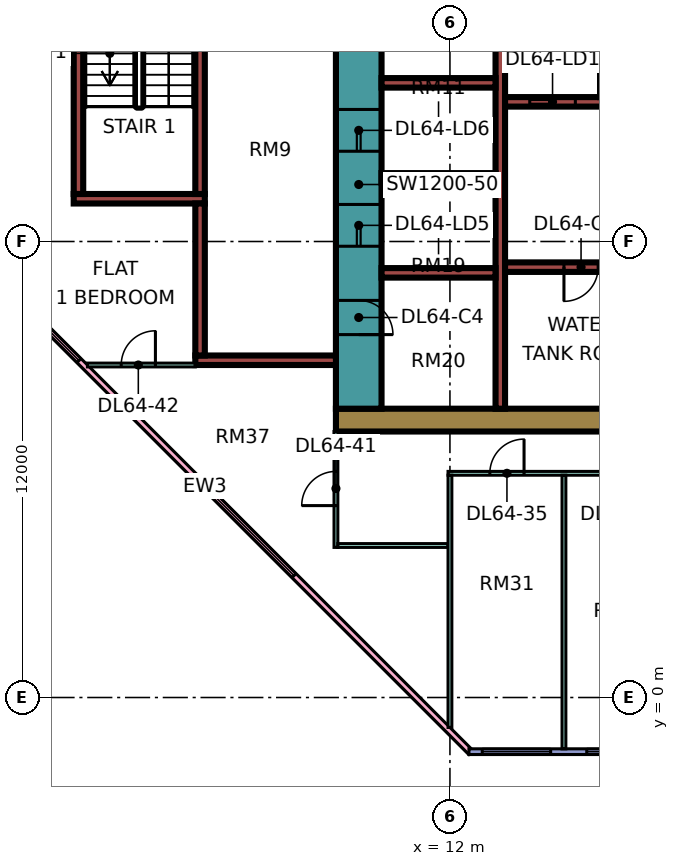
"""IFC4 building model, lengths in metres.
Left out: names, types, materials, properties, quantities, classifications, styles, units other than length and angle.
Written with IfcOpenShell. Run it as: python <this file> out.ifc"""

import sys

from ifc_helpers import new_model, si_unit, direction, frame, frame_2d, origin, place, context, subcontext, project, spatial, rectangle, extrude, element, fill, save


model = new_model("IFC4")
c1 = context("Model", 3, precision=1e-05, world=origin(), true_north=direction((0.0, 1.0)))
c2 = subcontext(c1, "Body", "Model", "MODEL_VIEW")
j1 = project(units=[si_unit("LENGTHUNIT", "METRE"), si_unit("PLANEANGLEUNIT", "RADIAN")], contexts=[c1])
p1 = place(None, origin())
s1 = spatial("IfcSite", under=j1, at=p1, CompositionType="ELEMENT")
p2 = place(p1, origin())
s2 = spatial("IfcBuilding", under=s1, at=p2, CompositionType="ELEMENT")
p3 = place(p2, frame((0.0, 0.0, 277.15)))
s3 = spatial("IfcBuildingStorey", under=s2, at=p3, CompositionType="ELEMENT", Elevation=277.15)
p4 = place(p3, frame((9.0, 7.3, 0.0), z_axis=(0.0, 0.0, 1.0), x_axis=(1.0, 0.0, 0.0)))
e1 = element("IfcWall", 1, at=p4, inside=s3, PredefinedType="SHEAR", context=c2, shape_type="SweptSolid", body=[
    extrude(rectangle(XDim=25.0, YDim=0.6, at=frame_2d((12.5, 0.0))), origin(), (0.0, 0.0, 1.0), 3.75),
])
p5 = place(p3, frame((9.6, 7.6, 0.0), z_axis=(0.0, 0.0, 1.0), x_axis=(0.0, 1.0, 0.0)))
e2 = element("IfcWall", 2, at=p5, inside=s3, PredefinedType="SHEAR", context=c2, shape_type="SweptSolid", body=[
    extrude(rectangle(XDim=11.8, YDim=1.2, at=frame_2d((5.9, 0.0))), origin(), (0.0, 0.0, 1.0), 3.75),
])
p6 = place(p5, frame((4.275, 0.0, 0.0)))
e3 = element("IfcOpeningElement", 3, at=p6, cuts=e2, PredefinedType="OPENING", context=c2, shape_type="SweptSolid", body=[
    extrude(rectangle(XDim=1.1, YDim=2.2, at=frame_2d((0.55, 1.1))), frame((0.0, 0.61, 0.0), z_axis=(0.0, -1.0, 0.0), x_axis=(1.0, 0.0, 0.0)), (0.0, 0.0, 1.0), 1.22),
])
p7 = place(p5, frame((6.775, 0.0, 0.0)))
e4 = element("IfcOpeningElement", 4, at=p7, cuts=e2, PredefinedType="OPENING", context=c2, shape_type="SweptSolid", body=[
    extrude(rectangle(XDim=1.1, YDim=2.2, at=frame_2d((0.55, 1.1))), frame((0.0, 0.61, 0.0), z_axis=(0.0, -1.0, 0.0), x_axis=(1.0, 0.0, 0.0)), (0.0, 0.0, 1.0), 1.22),
])
p8 = place(p5, frame((9.7, 0.0, 0.0)))
e5 = element("IfcOpeningElement", 5, at=p8, cuts=e2, PredefinedType="OPENING", context=c2, shape_type="SweptSolid", body=[
    extrude(rectangle(XDim=1.1, YDim=2.2, at=frame_2d((0.55, 1.1))), frame((0.0, 0.61, 0.0), z_axis=(0.0, -1.0, 0.0), x_axis=(1.0, 0.0, 0.0)), (0.0, 0.0, 1.0), 1.22),
])
p9 = place(p5, frame((1.95, 0.0, 0.0)))
e6 = element("IfcOpeningElement", 6, at=p9, cuts=e2, PredefinedType="OPENING", context=c2, shape_type="SweptSolid", body=[
    extrude(rectangle(XDim=0.9, YDim=2.1, at=frame_2d((0.45, 1.05))), frame((0.0, 0.61, 0.0), z_axis=(0.0, -1.0, 0.0), x_axis=(1.0, 0.0, 0.0)), (0.0, 0.0, 1.0), 1.22),
])
p10 = place(p3, frame((13.325, 7.6, 0.0), z_axis=(0.0, 0.0, 1.0), x_axis=(0.0, 1.0, 0.0)))
e7 = element("IfcWall", 7, at=p10, inside=s3, PredefinedType="SHEAR", context=c2, shape_type="SweptSolid", body=[
    extrude(rectangle(XDim=11.8, YDim=0.25, at=frame_2d((5.9, 0.0))), origin(), (0.0, 0.0, 1.0), 3.75),
])
p11 = place(p3, frame((13.45, 11.325, 0.0), z_axis=(0.0, 0.0, 1.0), x_axis=(1.0, 0.0, 0.0)))
e8 = element("IfcWall", 8, at=p11, inside=s3, PredefinedType="SHEAR", context=c2, shape_type="SweptSolid", body=[
    extrude(rectangle(XDim=19.95, YDim=0.25, at=frame_2d((9.975, 0.0))), origin(), (0.0, 0.0, 1.0), 3.75),
])
p12 = place(p11, frame((1.55, 0.0, 0.0)))
e9 = element("IfcOpeningElement", 9, at=p12, cuts=e8, PredefinedType="OPENING", context=c2, shape_type="SweptSolid", body=[
    extrude(rectangle(XDim=0.9, YDim=2.1, at=frame_2d((0.45, 1.05))), frame((0.0, 0.135, 0.0), z_axis=(0.0, -1.0, 0.0), x_axis=(1.0, 0.0, 0.0)), (0.0, 0.0, 1.0), 0.27),
])
p13 = place(p11, frame((5.05, 0.0, 0.0)))
e10 = element("IfcOpeningElement", 10, at=p13, cuts=e8, PredefinedType="OPENING", context=c2, shape_type="SweptSolid", body=[
    extrude(rectangle(XDim=0.9, YDim=2.1, at=frame_2d((0.45, 1.05))), frame((0.0, 0.135, 0.0), z_axis=(0.0, -1.0, 0.0), x_axis=(1.0, 0.0, 0.0)), (0.0, 0.0, 1.0), 0.27),
])
p14 = place(p11, frame((8.425, 0.0, 0.0)))
e11 = element("IfcOpeningElement", 11, at=p14, cuts=e8, PredefinedType="OPENING", context=c2, shape_type="SweptSolid", body=[
    extrude(rectangle(XDim=0.9, YDim=2.1, at=frame_2d((0.45, 1.05))), frame((0.0, 0.135, 0.0), z_axis=(0.0, -1.0, 0.0), x_axis=(1.0, 0.0, 0.0)), (0.0, 0.0, 1.0), 0.27),
])
p15 = place(p11, frame((15.025, 0.0, 0.0)))
e12 = element("IfcOpeningElement", 12, at=p15, cuts=e8, PredefinedType="OPENING", context=c2, shape_type="SweptSolid", body=[
    extrude(rectangle(XDim=0.9, YDim=2.1, at=frame_2d((0.45, 1.05))), frame((0.0, 0.135, 0.0), z_axis=(0.0, -1.0, 0.0), x_axis=(1.0, 0.0, 0.0)), (0.0, 0.0, 1.0), 0.27),
])
p16 = place(p3, frame((13.45, 15.675, 0.0), z_axis=(0.0, 0.0, 1.0), x_axis=(1.0, 0.0, 0.0)))
e13 = element("IfcWall", 13, at=p16, inside=s3, PredefinedType="SHEAR", context=c2, shape_type="SweptSolid", body=[
    extrude(rectangle(XDim=13.75, YDim=0.25, at=frame_2d((6.875, 0.0))), origin(), (0.0, 0.0, 1.0), 3.75),
])
p17 = place(p16, frame((0.65, 0.0, 0.0)))
e14 = element("IfcOpeningElement", 14, at=p17, cuts=e13, PredefinedType="OPENING", context=c2, shape_type="SweptSolid", body=[
    extrude(rectangle(XDim=1.2, YDim=2.2, at=frame_2d((0.6, 1.1))), frame((0.0, 0.135, 0.0), z_axis=(0.0, -1.0, 0.0), x_axis=(1.0, 0.0, 0.0)), (0.0, 0.0, 1.0), 0.27),
])
p18 = place(p16, frame((3.4, 0.0, 0.0)))
e15 = element("IfcOpeningElement", 15, at=p18, cuts=e13, PredefinedType="OPENING", context=c2, shape_type="SweptSolid", body=[
    extrude(rectangle(XDim=1.2, YDim=2.2, at=frame_2d((0.6, 1.1))), frame((0.0, 0.135, 0.0), z_axis=(0.0, -1.0, 0.0), x_axis=(1.0, 0.0, 0.0)), (0.0, 0.0, 1.0), 0.27),
])
p19 = place(p16, frame((6.15, 0.0, 0.0)))
e16 = element("IfcOpeningElement", 16, at=p19, cuts=e13, PredefinedType="OPENING", context=c2, shape_type="SweptSolid", body=[
    extrude(rectangle(XDim=1.2, YDim=2.2, at=frame_2d((0.6, 1.1))), frame((0.0, 0.135, 0.0), z_axis=(0.0, -1.0, 0.0), x_axis=(1.0, 0.0, 0.0)), (0.0, 0.0, 1.0), 0.27),
])
p20 = place(p16, frame((8.9, 0.0, 0.0)))
e17 = element("IfcOpeningElement", 17, at=p20, cuts=e13, PredefinedType="OPENING", context=c2, shape_type="SweptSolid", body=[
    extrude(rectangle(XDim=1.2, YDim=2.2, at=frame_2d((0.6, 1.1))), frame((0.0, 0.135, 0.0), z_axis=(0.0, -1.0, 0.0), x_axis=(1.0, 0.0, 0.0)), (0.0, 0.0, 1.0), 0.27),
])
p21 = place(p16, frame((11.8, 0.0, 0.0)))
e18 = element("IfcOpeningElement", 18, at=p21, cuts=e13, PredefinedType="OPENING", context=c2, shape_type="SweptSolid", body=[
    extrude(rectangle(XDim=0.9, YDim=2.1, at=frame_2d((0.45, 1.05))), frame((0.0, 0.135, 0.0), z_axis=(0.0, -1.0, 0.0), x_axis=(1.0, 0.0, 0.0)), (0.0, 0.0, 1.0), 0.27),
])
for number, where, z_axis, x_axis in (
    (19, (10.2, 11.175, 0.0), (0.0, 0.0, 1.0), (1.0, 0.0, 0.0)),
    (20, (10.2, 13.675, 0.0), (0.0, 0.0, 1.0), (1.0, 0.0, 0.0)),
    (21, (10.2, 16.175, 0.0), (0.0, 0.0, 1.0), (1.0, 0.0, 0.0)),
):
    element("IfcWall", number, at=place(p3, frame(where, z_axis=z_axis, x_axis=x_axis)), inside=s3, PredefinedType="SHEAR", context=c2, shape_type="SweptSolid", body=[
        extrude(rectangle(XDim=3.0, YDim=0.25, at=frame_2d((1.5, 0.0))), origin(), (0.0, 0.0, 1.0), 3.75),
    ])
p22 = place(p3, frame((2.1, 13.125, 0.0), z_axis=(0.0, 0.0, 1.0), x_axis=(1.0, 0.0, 0.0)))
e22 = element("IfcWall", 22, at=p22, inside=s3, PredefinedType="SHEAR", context=c2, shape_type="SweptSolid", body=[
    extrude(rectangle(XDim=3.45, YDim=0.25, at=frame_2d((1.725, 0.0))), origin(), (0.0, 0.0, 1.0), 3.75),
])
p23 = place(p3, frame((2.225, 13.25, 0.0), z_axis=(0.0, 0.0, 1.0), x_axis=(0.0, 1.0, 0.0)))
e23 = element("IfcWall", 23, at=p23, inside=s3, PredefinedType="SHEAR", context=c2, shape_type="SweptSolid", body=[
    extrude(rectangle(XDim=6.5, YDim=0.25, at=frame_2d((3.25, 0.0))), origin(), (0.0, 0.0, 1.0), 3.75),
])
p24 = place(p3, frame((5.425, 13.25, 0.0), z_axis=(0.0, 0.0, 1.0), x_axis=(0.0, 1.0, 0.0)))
e24 = element("IfcWall", 24, at=p24, inside=s3, PredefinedType="SHEAR", context=c2, shape_type="SweptSolid", body=[
    extrude(rectangle(XDim=6.5, YDim=0.25, at=frame_2d((3.25, 0.0))), origin(), (0.0, 0.0, 1.0), 3.75),
])
p25 = place(p24, frame((5.25, 0.0, 0.0)))
e25 = element("IfcOpeningElement", 25, at=p25, cuts=e24, PredefinedType="OPENING", context=c2, shape_type="SweptSolid", body=[
    extrude(rectangle(XDim=1.1, YDim=2.2, at=frame_2d((0.55, 1.1))), frame((0.0, 0.135, 0.0), z_axis=(0.0, -1.0, 0.0), x_axis=(1.0, 0.0, 0.0)), (0.0, 0.0, 1.0), 0.27),
])
p26 = place(p3, frame((5.3, 8.875, 0.0), z_axis=(0.0, 0.0, 1.0), x_axis=(1.0, 0.0, 0.0)))
e26 = element("IfcWall", 26, at=p26, inside=s3, PredefinedType="SHEAR", context=c2, shape_type="SweptSolid", body=[
    extrude(rectangle(XDim=3.7, YDim=0.25, at=frame_2d((1.85, 0.0))), origin(), (0.0, 0.0, 1.0), 3.75),
])
p27 = place(p3, frame((5.425, 9.0, 0.0), z_axis=(0.0, 0.0, 1.0), x_axis=(0.0, 1.0, 0.0)))
e27 = element("IfcWall", 27, at=p27, inside=s3, PredefinedType="SHEAR", context=c2, shape_type="SweptSolid", body=[
    extrude(rectangle(XDim=4.0, YDim=0.25, at=frame_2d((2.0, 0.0))), origin(), (0.0, 0.0, 1.0), 3.75),
])
p28 = place(p3, frame((-1.447, 12.553, 0.0), z_axis=(0.0, 0.0, 1.0), x_axis=(0.707106781187, -0.707106781187, 0.0)))
e28 = element("IfcWall", 28, at=p28, inside=s3, PredefinedType="SOLIDWALL", context=c2, shape_type="SweptSolid", body=[
    extrude(rectangle(XDim=19.799, YDim=0.15, at=frame_2d((9.899, 0.0))), origin(), (0.0, 0.0, 1.0), 3.35),
])
p29 = place(p28, frame((2.212, 0.0, 0.45)))
e29 = element("IfcOpeningElement", 29, at=p29, cuts=e28, PredefinedType="OPENING", context=c2, shape_type="SweptSolid", body=[
    extrude(rectangle(XDim=3.0, YDim=2.4, at=frame_2d((1.5, 1.2))), frame((0.0, 0.085, 0.0), z_axis=(0.0, -1.0, 0.0), x_axis=(1.0, 0.0, 0.0)), (0.0, 0.0, 1.0), 0.17),
])
p30 = place(p28, frame((10.216, 0.0, 0.45)))
e30 = element("IfcOpeningElement", 30, at=p30, cuts=e28, PredefinedType="OPENING", context=c2, shape_type="SweptSolid", body=[
    extrude(rectangle(XDim=3.0, YDim=2.4, at=frame_2d((1.5, 1.2))), frame((0.0, 0.085, 0.0), z_axis=(0.0, -1.0, 0.0), x_axis=(1.0, 0.0, 0.0)), (0.0, 0.0, 1.0), 0.17),
])
p31 = place(p3, frame((12.5, -1.425, 0.0), z_axis=(0.0, 0.0, 1.0), x_axis=(1.0, 0.0, 0.0)))
e31 = element("IfcWall", 31, at=p31, inside=s3, PredefinedType="SOLIDWALL", context=c2, shape_type="SweptSolid", body=[
    extrude(rectangle(XDim=11.425, YDim=0.15, at=frame_2d((5.712, 0.0))), origin(), (0.0, 0.0, 1.0), 3.35),
])
p32 = place(p31, frame((0.35, 0.0, 0.45)))
e32 = element("IfcOpeningElement", 32, at=p32, cuts=e31, PredefinedType="OPENING", context=c2, shape_type="SweptSolid", body=[
    extrude(rectangle(XDim=1.8, YDim=2.4, at=frame_2d((0.9, 1.2))), frame((0.0, 0.085, 0.0), z_axis=(0.0, -1.0, 0.0), x_axis=(1.0, 0.0, 0.0)), (0.0, 0.0, 1.0), 0.17),
])
p33 = place(p31, frame((3.1, 0.0, 0.45)))
e33 = element("IfcOpeningElement", 33, at=p33, cuts=e31, PredefinedType="OPENING", context=c2, shape_type="SweptSolid", body=[
    extrude(rectangle(XDim=1.8, YDim=2.4, at=frame_2d((0.9, 1.2))), frame((0.0, 0.085, 0.0), z_axis=(0.0, -1.0, 0.0), x_axis=(1.0, 0.0, 0.0)), (0.0, 0.0, 1.0), 0.17),
])
p34 = place(p31, frame((6.1, 0.0, 0.45)))
e34 = element("IfcOpeningElement", 34, at=p34, cuts=e31, PredefinedType="OPENING", context=c2, shape_type="SweptSolid", body=[
    extrude(rectangle(XDim=1.8, YDim=2.4, at=frame_2d((0.9, 1.2))), frame((0.0, 0.085, 0.0), z_axis=(0.0, -1.0, 0.0), x_axis=(1.0, 0.0, 0.0)), (0.0, 0.0, 1.0), 0.17),
])
p35 = place(p31, frame((9.062, 0.0, 0.45)))
e35 = element("IfcOpeningElement", 35, at=p35, cuts=e31, PredefinedType="OPENING", context=c2, shape_type="SweptSolid", body=[
    extrude(rectangle(XDim=1.8, YDim=2.4, at=frame_2d((0.9, 1.2))), frame((0.0, 0.085, 0.0), z_axis=(0.0, -1.0, 0.0), x_axis=(1.0, 0.0, 0.0)), (0.0, 0.0, 1.0), 0.17),
])
p36 = place(p3, frame((2.461, 8.75, 0.0), z_axis=(0.0, 0.0, 1.0), x_axis=(1.0, 0.0, 0.0)))
e36 = element("IfcWall", 36, at=p36, inside=s3, PredefinedType="PARTITIONING", context=c2, shape_type="SweptSolid", body=[
    extrude(rectangle(XDim=2.839, YDim=0.1, at=frame_2d((1.419, 0.0))), origin(), (0.0, 0.0, 1.0), 3.35),
])
p37 = place(p36, frame((0.889, 0.0, 0.0)))
e37 = element("IfcOpeningElement", 37, at=p37, cuts=e36, PredefinedType="OPENING", context=c2, shape_type="SweptSolid", body=[
    extrude(rectangle(XDim=0.9, YDim=2.1, at=frame_2d((0.45, 1.05))), frame((0.0, 0.06, 0.0), z_axis=(0.0, -1.0, 0.0), x_axis=(1.0, 0.0, 0.0)), (0.0, 0.0, 1.0), 0.12),
])
p38 = place(p3, frame((9.0, 3.95, 0.0), z_axis=(0.0, 0.0, 1.0), x_axis=(0.0, 1.0, 0.0)))
e38 = element("IfcWall", 38, at=p38, inside=s3, PredefinedType="PARTITIONING", context=c2, shape_type="SweptSolid", body=[
    extrude(rectangle(XDim=3.05, YDim=0.1, at=frame_2d((1.525, 0.0))), origin(), (0.0, 0.0, 1.0), 3.35),
])
p39 = place(p38, frame((1.1, 0.0, 0.0)))
e39 = element("IfcOpeningElement", 39, at=p39, cuts=e38, PredefinedType="OPENING", context=c2, shape_type="SweptSolid", body=[
    extrude(rectangle(XDim=0.9, YDim=2.1, at=frame_2d((0.45, 1.05))), frame((0.0, 0.06, 0.0), z_axis=(0.0, -1.0, 0.0), x_axis=(1.0, 0.0, 0.0)), (0.0, 0.0, 1.0), 0.12),
])
p40 = place(p3, frame((9.05, 4.0, 0.0), z_axis=(0.0, 0.0, 1.0), x_axis=(1.0, 0.0, 0.0)))
e40 = element("IfcWall", 40, at=p40, inside=s3, PredefinedType="PARTITIONING", context=c2, shape_type="SweptSolid", body=[
    extrude(rectangle(XDim=2.9, YDim=0.1, at=frame_2d((1.45, 0.0))), origin(), (0.0, 0.0, 1.0), 3.35),
])
p41 = place(p3, frame((11.95, 5.9, 0.0), z_axis=(0.0, 0.0, 1.0), x_axis=(1.0, 0.0, 0.0)))
e41 = element("IfcWall", 41, at=p41, inside=s3, PredefinedType="PARTITIONING", context=c2, shape_type="SweptSolid", body=[
    extrude(rectangle(XDim=21.1, YDim=0.1, at=frame_2d((10.55, 0.0))), origin(), (0.0, 0.0, 1.0), 3.35),
])
p42 = place(p41, frame((1.1, 0.0, 0.0)))
e42 = element("IfcOpeningElement", 42, at=p42, cuts=e41, PredefinedType="OPENING", context=c2, shape_type="SweptSolid", body=[
    extrude(rectangle(XDim=0.9, YDim=2.1, at=frame_2d((0.45, 1.05))), frame((0.0, 0.06, 0.0), z_axis=(0.0, -1.0, 0.0), x_axis=(1.0, 0.0, 0.0)), (0.0, 0.0, 1.0), 0.12),
])
p43 = place(p41, frame((4.1, 0.0, 0.0)))
e43 = element("IfcOpeningElement", 43, at=p43, cuts=e41, PredefinedType="OPENING", context=c2, shape_type="SweptSolid", body=[
    extrude(rectangle(XDim=0.9, YDim=2.1, at=frame_2d((0.45, 1.05))), frame((0.0, 0.06, 0.0), z_axis=(0.0, -1.0, 0.0), x_axis=(1.0, 0.0, 0.0)), (0.0, 0.0, 1.0), 0.12),
])
p44 = place(p41, frame((7.1, 0.0, 0.0)))
e44 = element("IfcOpeningElement", 44, at=p44, cuts=e41, PredefinedType="OPENING", context=c2, shape_type="SweptSolid", body=[
    extrude(rectangle(XDim=0.9, YDim=2.1, at=frame_2d((0.45, 1.05))), frame((0.0, 0.06, 0.0), z_axis=(0.0, -1.0, 0.0), x_axis=(1.0, 0.0, 0.0)), (0.0, 0.0, 1.0), 0.12),
])
p45 = place(p41, frame((10.1, 0.0, 0.0)))
e45 = element("IfcOpeningElement", 45, at=p45, cuts=e41, PredefinedType="OPENING", context=c2, shape_type="SweptSolid", body=[
    extrude(rectangle(XDim=0.9, YDim=2.1, at=frame_2d((0.45, 1.05))), frame((0.0, 0.06, 0.0), z_axis=(0.0, -1.0, 0.0), x_axis=(1.0, 0.0, 0.0)), (0.0, 0.0, 1.0), 0.12),
])
p46 = place(p41, frame((16.1, 0.0, 0.0)))
e46 = element("IfcOpeningElement", 46, at=p46, cuts=e41, PredefinedType="OPENING", context=c2, shape_type="SweptSolid", body=[
    extrude(rectangle(XDim=0.9, YDim=2.1, at=frame_2d((0.45, 1.05))), frame((0.0, 0.06, 0.0), z_axis=(0.0, -1.0, 0.0), x_axis=(1.0, 0.0, 0.0)), (0.0, 0.0, 1.0), 0.12),
])
p47 = place(p3, frame((12.0, -0.788, 0.0), z_axis=(0.0, 0.0, 1.0), x_axis=(0.0, 1.0, 0.0)))
e47 = element("IfcWall", 47, at=p47, inside=s3, PredefinedType="PARTITIONING", context=c2, shape_type="SweptSolid", body=[
    extrude(rectangle(XDim=6.638, YDim=0.1, at=frame_2d((3.319, 0.0))), origin(), (0.0, 0.0, 1.0), 3.35),
])
p48 = place(p3, frame((15.0, -1.351, 0.0), z_axis=(0.0, 0.0, 1.0), x_axis=(0.0, 1.0, 0.0)))
e48 = element("IfcWall", 48, at=p48, inside=s3, PredefinedType="PARTITIONING", context=c2, shape_type="SweptSolid", body=[
    extrude(rectangle(XDim=7.201, YDim=0.1, at=frame_2d((3.601, 0.0))), origin(), (0.0, 0.0, 1.0), 3.35),
])
p49 = place(p29, origin())
e49 = element("IfcWindow", 49, at=p49, inside=s3, PartitioningType="SINGLE_PANEL", PredefinedType="WINDOW", context=c2, shape_type="SweptSolid", body=[
    extrude(rectangle(XDim=3.0, YDim=2.4, at=frame_2d((1.5, 1.2))), frame((0.0, 0.03, 0.0), z_axis=(0.0, -1.0, 0.0), x_axis=(1.0, 0.0, 0.0)), (0.0, 0.0, 1.0), 0.06),
])
fill(e29, e49)
p50 = place(p30, origin())
e50 = element("IfcWindow", 50, at=p50, inside=s3, PartitioningType="SINGLE_PANEL", PredefinedType="WINDOW", context=c2, shape_type="SweptSolid", body=[
    extrude(rectangle(XDim=3.0, YDim=2.4, at=frame_2d((1.5, 1.2))), frame((0.0, 0.03, 0.0), z_axis=(0.0, -1.0, 0.0), x_axis=(1.0, 0.0, 0.0)), (0.0, 0.0, 1.0), 0.06),
])
fill(e30, e50)
p51 = place(p32, origin())
e51 = element("IfcWindow", 51, at=p51, inside=s3, PartitioningType="SINGLE_PANEL", PredefinedType="WINDOW", context=c2, shape_type="SweptSolid", body=[
    extrude(rectangle(XDim=1.8, YDim=2.4, at=frame_2d((0.9, 1.2))), frame((0.0, 0.03, 0.0), z_axis=(0.0, -1.0, 0.0), x_axis=(1.0, 0.0, 0.0)), (0.0, 0.0, 1.0), 0.06),
])
fill(e32, e51)
p52 = place(p33, origin())
e52 = element("IfcWindow", 52, at=p52, inside=s3, PartitioningType="SINGLE_PANEL", PredefinedType="WINDOW", context=c2, shape_type="SweptSolid", body=[
    extrude(rectangle(XDim=1.8, YDim=2.4, at=frame_2d((0.9, 1.2))), frame((0.0, 0.03, 0.0), z_axis=(0.0, -1.0, 0.0), x_axis=(1.0, 0.0, 0.0)), (0.0, 0.0, 1.0), 0.06),
])
fill(e33, e52)
p53 = place(p17, origin())
e53 = element("IfcDoor", 53, at=p53, inside=s3, OperationType="DOUBLE_DOOR_SLIDING", PredefinedType="DOOR", context=c2, shape_type="SweptSolid", body=[
    extrude(rectangle(XDim=1.2, YDim=2.2, at=frame_2d((0.6, 1.1))), frame((0.0, 0.025, 0.0), z_axis=(0.0, -1.0, 0.0), x_axis=(1.0, 0.0, 0.0)), (0.0, 0.0, 1.0), 0.05),
])
fill(e14, e53)
p54 = place(p6, origin())
e54 = element("IfcDoor", 54, at=p54, inside=s3, OperationType="DOUBLE_DOOR_SLIDING", PredefinedType="DOOR", context=c2, shape_type="SweptSolid", body=[
    extrude(rectangle(XDim=1.1, YDim=2.2, at=frame_2d((0.55, 1.1))), frame((0.0, 0.025, 0.0), z_axis=(0.0, -1.0, 0.0), x_axis=(1.0, 0.0, 0.0)), (0.0, 0.0, 1.0), 0.05),
])
fill(e3, e54)
p55 = place(p7, origin())
e55 = element("IfcDoor", 55, at=p55, inside=s3, OperationType="DOUBLE_DOOR_SLIDING", PredefinedType="DOOR", context=c2, shape_type="SweptSolid", body=[
    extrude(rectangle(XDim=1.1, YDim=2.2, at=frame_2d((0.55, 1.1))), frame((0.0, 0.025, 0.0), z_axis=(0.0, -1.0, 0.0), x_axis=(1.0, 0.0, 0.0)), (0.0, 0.0, 1.0), 0.05),
])
fill(e4, e55)
p56 = place(p9, frame((0.9, 0.0, 0.0), z_axis=(0.0, 0.0, 1.0), x_axis=(-1.0, 0.0, 0.0)))
e56 = element("IfcDoor", 56, at=p56, inside=s3, OperationType="SINGLE_SWING_LEFT", PredefinedType="DOOR", context=c2, shape_type="SweptSolid", body=[
    extrude(rectangle(XDim=0.9, YDim=2.1, at=frame_2d((0.45, 1.05))), frame((0.0, 0.025, 0.0), z_axis=(0.0, -1.0, 0.0), x_axis=(1.0, 0.0, 0.0)), (0.0, 0.0, 1.0), 0.05),
])
fill(e6, e56)
p57 = place(p12, frame((0.9, 0.0, 0.0), z_axis=(0.0, 0.0, 1.0), x_axis=(-1.0, 0.0, 0.0)))
e57 = element("IfcDoor", 57, at=p57, inside=s3, OperationType="SINGLE_SWING_LEFT", PredefinedType="DOOR", context=c2, shape_type="SweptSolid", body=[
    extrude(rectangle(XDim=0.9, YDim=2.1, at=frame_2d((0.45, 1.05))), frame((0.0, 0.025, 0.0), z_axis=(0.0, -1.0, 0.0), x_axis=(1.0, 0.0, 0.0)), (0.0, 0.0, 1.0), 0.05),
])
fill(e9, e57)
p58 = place(p42, frame((0.9, 0.0, 0.0), z_axis=(0.0, 0.0, 1.0), x_axis=(-1.0, 0.0, 0.0)))
e58 = element("IfcDoor", 58, at=p58, inside=s3, OperationType="SINGLE_SWING_RIGHT", PredefinedType="DOOR", context=c2, shape_type="SweptSolid", body=[
    extrude(rectangle(XDim=0.9, YDim=2.1, at=frame_2d((0.45, 1.05))), frame((0.0, 0.025, 0.0), z_axis=(0.0, -1.0, 0.0), x_axis=(1.0, 0.0, 0.0)), (0.0, 0.0, 1.0), 0.05),
])
fill(e42, e58)
p59 = place(p39, origin())
e59 = element("IfcDoor", 59, at=p59, inside=s3, OperationType="SINGLE_SWING_LEFT", PredefinedType="DOOR", context=c2, shape_type="SweptSolid", body=[
    extrude(rectangle(XDim=0.9, YDim=2.1, at=frame_2d((0.45, 1.05))), frame((0.0, 0.025, 0.0), z_axis=(0.0, -1.0, 0.0), x_axis=(1.0, 0.0, 0.0)), (0.0, 0.0, 1.0), 0.05),
])
fill(e39, e59)
p60 = place(p37, frame((0.9, 0.0, 0.0), z_axis=(0.0, 0.0, 1.0), x_axis=(-1.0, 0.0, 0.0)))
e60 = element("IfcDoor", 60, at=p60, inside=s3, OperationType="SINGLE_SWING_RIGHT", PredefinedType="DOOR", context=c2, shape_type="SweptSolid", body=[
    extrude(rectangle(XDim=0.9, YDim=2.1, at=frame_2d((0.45, 1.05))), frame((0.0, 0.025, 0.0), z_axis=(0.0, -1.0, 0.0), x_axis=(1.0, 0.0, 0.0)), (0.0, 0.0, 1.0), 0.05),
])
fill(e37, e60)
save(model, sys.argv[1])
